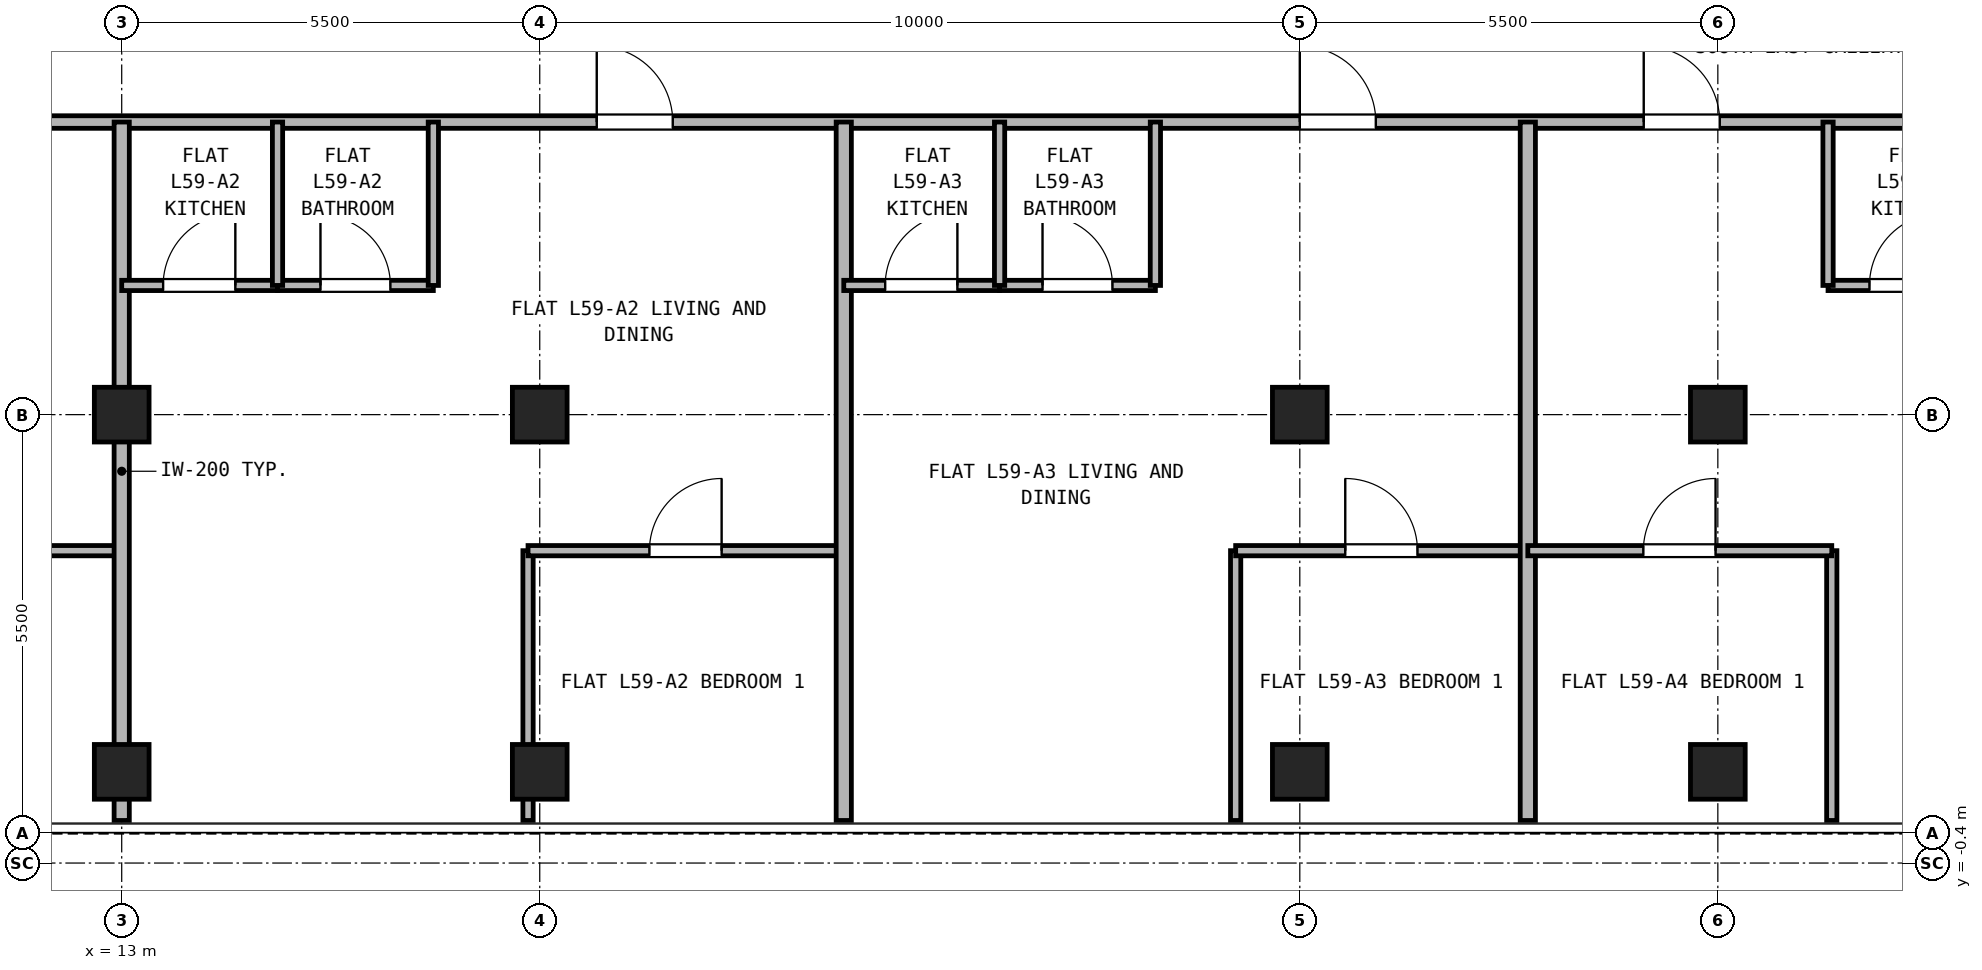
"""IFC4 building model, lengths in metres.
Left out: names, types, materials, properties, quantities, classifications, styles, units other than length and angle.
Written with IfcOpenShell. Run it as: python <this file> out.ifc"""

import sys

from ifc_helpers import new_model, si_unit, direction, frame, frame_2d, origin, origin_2d, place, context, subcontext, project, spatial, rectangle, hollow_rectangle, extrude, source, transform, mapped, element, fill, save


model = new_model("IFC4")
c1 = context("Model", 3, precision=1e-05, world=origin(), true_north=direction((0.0, 1.0)))
c2 = subcontext(c1, "Body", "Model", "MODEL_VIEW")
j1 = project(units=[si_unit("LENGTHUNIT", "METRE"), si_unit("PLANEANGLEUNIT", "RADIAN")], contexts=[c1])
p1 = place(None, origin())
s1 = spatial("IfcSite", under=j1, at=p1, CompositionType="ELEMENT")
p2 = place(p1, origin())
s2 = spatial("IfcBuilding", under=s1, at=p2, CompositionType="ELEMENT")
p3 = place(p2, frame((0.0, 0.0, 209.2)))
s3 = spatial("IfcBuildingStorey", under=s2, at=p3, CompositionType="ELEMENT", Elevation=209.2)
m1 = source(origin(), c2, "Body", "SweptSolid", [
    extrude(hollow_rectangle(XDim=0.72, YDim=0.72, WallThickness=0.04, at=origin_2d()), origin(), (0.0, 0.0, 1.0), 2.95),
])
for number, where, z_axis, x_axis in (
    (1, (13.0, 0.8, 0.0), (0.0, 0.0, 1.0), (1.0, 0.0, 0.0)),
    (2, (18.5, 0.8, 0.0), (0.0, 0.0, 1.0), (1.0, 0.0, 0.0)),
    (3, (28.5, 0.8, 0.0), (0.0, 0.0, 1.0), (1.0, 0.0, 0.0)),
    (4, (34.0, 0.8, 0.0), (0.0, 0.0, 1.0), (1.0, 0.0, 0.0)),
    (5, (13.0, 5.5, 0.0), (0.0, 0.0, 1.0), (1.0, 0.0, 0.0)),
    (6, (18.5, 5.5, 0.0), (0.0, 0.0, 1.0), (1.0, 0.0, 0.0)),
    (7, (28.5, 5.5, 0.0), (0.0, 0.0, 1.0), (1.0, 0.0, 0.0)),
    (8, (34.0, 5.5, 0.0), (0.0, 0.0, 1.0), (1.0, 0.0, 0.0)),
):
    element("IfcColumn", number, at=place(p3, frame(where, z_axis=z_axis, x_axis=x_axis)), inside=s3, PredefinedType="COLUMN", context=c2, shape_type="MappedRepresentation", body=[
        mapped(m1, transform((0.0, 0.0, 0.0), x_axis=(1.0, 0.0, 0.0), y_axis=(0.0, 1.0, 0.0), z_axis=(0.0, 0.0, 1.0), scale=1.0)),
    ])
p4 = place(p3, frame((0.16, 9.35, 0.0), z_axis=(0.0, 0.0, 1.0), x_axis=(1.0, 0.0, 0.0)))
e9 = element("IfcWall", 9, at=p4, inside=s3, PredefinedType="PARTITIONING", context=c2, shape_type="SweptSolid", body=[
    extrude(rectangle(XDim=41.48, YDim=0.165, at=frame_2d((20.74, 0.0))), origin(), (0.0, 0.0, 1.0), 2.95),
])
p5 = place(p4, frame((9.64, 0.0, 0.0)))
e10 = element("IfcOpeningElement", 10, at=p5, cuts=e9, PredefinedType="OPENING", context=c2, shape_type="SweptSolid", body=[
    extrude(rectangle(XDim=1.0, YDim=2.15, at=frame_2d((0.5, 1.075))), frame((0.0, 0.093, 0.0), z_axis=(0.0, -1.0, 0.0), x_axis=(1.0, 0.0, 0.0)), (0.0, 0.0, 1.0), 0.185),
])
p6 = place(p4, frame((19.09, 0.0, 0.0)))
e11 = element("IfcOpeningElement", 11, at=p6, cuts=e9, PredefinedType="OPENING", context=c2, shape_type="SweptSolid", body=[
    extrude(rectangle(XDim=1.0, YDim=2.15, at=frame_2d((0.5, 1.075))), frame((0.0, 0.093, 0.0), z_axis=(0.0, -1.0, 0.0), x_axis=(1.0, 0.0, 0.0)), (0.0, 0.0, 1.0), 0.185),
])
p7 = place(p4, frame((28.34, 0.0, 0.0)))
e12 = element("IfcOpeningElement", 12, at=p7, cuts=e9, PredefinedType="OPENING", context=c2, shape_type="SweptSolid", body=[
    extrude(rectangle(XDim=1.0, YDim=2.15, at=frame_2d((0.5, 1.075))), frame((0.0, 0.093, 0.0), z_axis=(0.0, -1.0, 0.0), x_axis=(1.0, 0.0, 0.0)), (0.0, 0.0, 1.0), 0.185),
])
p8 = place(p4, frame((32.865, 0.0, 0.0)))
e13 = element("IfcOpeningElement", 13, at=p8, cuts=e9, PredefinedType="OPENING", context=c2, shape_type="SweptSolid", body=[
    extrude(rectangle(XDim=1.0, YDim=2.15, at=frame_2d((0.5, 1.075))), frame((0.0, 0.093, 0.0), z_axis=(0.0, -1.0, 0.0), x_axis=(1.0, 0.0, 0.0)), (0.0, 0.0, 1.0), 0.185),
])
p9 = place(p3, frame((7.327, 3.71, 0.0), z_axis=(0.0, 0.0, 1.0), x_axis=(1.0, 0.0, 0.0)))
e14 = element("IfcWall", 14, at=p9, inside=s3, PredefinedType="PARTITIONING", context=c2, shape_type="SweptSolid", body=[
    extrude(rectangle(XDim=5.673, YDim=0.135, at=frame_2d((2.836, 0.0))), origin(), (0.0, 0.0, 1.0), 2.95),
])
p10 = place(p9, frame((2.356, 0.0, 0.0)))
e15 = element("IfcOpeningElement", 15, at=p10, cuts=e14, PredefinedType="OPENING", context=c2, shape_type="SweptSolid", body=[
    extrude(rectangle(XDim=0.95, YDim=2.15, at=frame_2d((0.475, 1.075))), frame((0.0, 0.077, 0.0), z_axis=(0.0, -1.0, 0.0), x_axis=(1.0, 0.0, 0.0)), (0.0, 0.0, 1.0), 0.155),
])
p11 = place(p3, frame((13.0, 0.16, 0.0), z_axis=(0.0, 0.0, 1.0), x_axis=(0.0, 1.0, 0.0)))
e16 = element("IfcWall", 16, at=p11, inside=s3, PredefinedType="PARTITIONING", context=c2, shape_type="SweptSolid", body=[
    extrude(rectangle(XDim=9.19, YDim=0.2, at=frame_2d((4.595, 0.0))), origin(), (0.0, 0.0, 1.0), 2.323),
])
p12 = place(p3, frame((13.0, 7.2, 0.0), z_axis=(0.0, 0.0, 1.0), x_axis=(1.0, 0.0, 0.0)))
e17 = element("IfcWall", 17, at=p12, inside=s3, PredefinedType="PARTITIONING", context=c2, shape_type="SweptSolid", body=[
    extrude(rectangle(XDim=2.05, YDim=0.135, at=frame_2d((1.025, 0.0))), origin(), (0.0, 0.0, 1.0), 2.95),
])
p13 = place(p12, frame((0.545, 0.0, 0.0)))
e18 = element("IfcOpeningElement", 18, at=p13, cuts=e17, PredefinedType="OPENING", context=c2, shape_type="SweptSolid", body=[
    extrude(rectangle(XDim=0.95, YDim=2.15, at=frame_2d((0.475, 1.075))), frame((0.0, 0.077, 0.0), z_axis=(0.0, -1.0, 0.0), x_axis=(1.0, 0.0, 0.0)), (0.0, 0.0, 1.0), 0.155),
])
p14 = place(p3, frame((15.05, 7.2, 0.0), z_axis=(0.0, 0.0, 1.0), x_axis=(1.0, 0.0, 0.0)))
e19 = element("IfcWall", 19, at=p14, inside=s3, PredefinedType="PARTITIONING", context=c2, shape_type="SweptSolid", body=[
    extrude(rectangle(XDim=2.05, YDim=0.135, at=frame_2d((1.025, 0.0))), origin(), (0.0, 0.0, 1.0), 2.95),
])
p15 = place(p14, frame((0.565, 0.0, 0.0)))
e20 = element("IfcOpeningElement", 20, at=p15, cuts=e19, PredefinedType="OPENING", context=c2, shape_type="SweptSolid", body=[
    extrude(rectangle(XDim=0.92, YDim=2.1, at=frame_2d((0.46, 1.05))), frame((0.0, 0.077, 0.0), z_axis=(0.0, -1.0, 0.0), x_axis=(1.0, 0.0, 0.0)), (0.0, 0.0, 1.0), 0.155),
])
for number, where, z_axis, x_axis in (
    (21, (15.05, 7.2, 0.0), (0.0, 0.0, 1.0), (0.0, 1.0, 0.0)),
    (22, (17.1, 7.2, 0.0), (0.0, 0.0, 1.0), (0.0, 1.0, 0.0)),
):
    element("IfcWall", number, at=place(p3, frame(where, z_axis=z_axis, x_axis=x_axis)), inside=s3, PredefinedType="PARTITIONING", context=c2, shape_type="SweptSolid", body=[
        extrude(rectangle(XDim=2.15, YDim=0.135, at=frame_2d((1.075, 0.0))), origin(), (0.0, 0.0, 1.0), 2.95),
    ])
p16 = place(p3, frame((18.346, 0.16, 0.0), z_axis=(0.0, 0.0, 1.0), x_axis=(0.0, 1.0, 0.0)))
e23 = element("IfcWall", 23, at=p16, inside=s3, PredefinedType="PARTITIONING", context=c2, shape_type="SweptSolid", body=[
    extrude(rectangle(XDim=3.55, YDim=0.135, at=frame_2d((1.775, 0.0))), origin(), (0.0, 0.0, 1.0), 2.323),
])
p17 = place(p3, frame((18.346, 3.71, 0.0), z_axis=(0.0, 0.0, 1.0), x_axis=(1.0, 0.0, 0.0)))
e24 = element("IfcWall", 24, at=p17, inside=s3, PredefinedType="PARTITIONING", context=c2, shape_type="SweptSolid", body=[
    extrude(rectangle(XDim=4.154, YDim=0.135, at=frame_2d((2.077, 0.0))), origin(), (0.0, 0.0, 1.0), 2.95),
])
p18 = place(p17, frame((1.597, 0.0, 0.0)))
e25 = element("IfcOpeningElement", 25, at=p18, cuts=e24, PredefinedType="OPENING", context=c2, shape_type="SweptSolid", body=[
    extrude(rectangle(XDim=0.95, YDim=2.15, at=frame_2d((0.475, 1.075))), frame((0.0, 0.077, 0.0), z_axis=(0.0, -1.0, 0.0), x_axis=(1.0, 0.0, 0.0)), (0.0, 0.0, 1.0), 0.155),
])
p19 = place(p3, frame((22.5, 0.16, 0.0), z_axis=(0.0, 0.0, 1.0), x_axis=(0.0, 1.0, 0.0)))
e26 = element("IfcWall", 26, at=p19, inside=s3, PredefinedType="PARTITIONING", context=c2, shape_type="SweptSolid", body=[
    extrude(rectangle(XDim=9.19, YDim=0.2, at=frame_2d((4.595, 0.0))), origin(), (0.0, 0.0, 1.0), 2.95),
])
p20 = place(p3, frame((22.5, 7.2, 0.0), z_axis=(0.0, 0.0, 1.0), x_axis=(1.0, 0.0, 0.0)))
e27 = element("IfcWall", 27, at=p20, inside=s3, PredefinedType="PARTITIONING", context=c2, shape_type="SweptSolid", body=[
    extrude(rectangle(XDim=2.05, YDim=0.135, at=frame_2d((1.025, 0.0))), origin(), (0.0, 0.0, 1.0), 2.95),
])
p21 = place(p20, frame((0.545, 0.0, 0.0)))
e28 = element("IfcOpeningElement", 28, at=p21, cuts=e27, PredefinedType="OPENING", context=c2, shape_type="SweptSolid", body=[
    extrude(rectangle(XDim=0.95, YDim=2.15, at=frame_2d((0.475, 1.075))), frame((0.0, 0.077, 0.0), z_axis=(0.0, -1.0, 0.0), x_axis=(1.0, 0.0, 0.0)), (0.0, 0.0, 1.0), 0.155),
])
p22 = place(p3, frame((24.55, 7.2, 0.0), z_axis=(0.0, 0.0, 1.0), x_axis=(1.0, 0.0, 0.0)))
e29 = element("IfcWall", 29, at=p22, inside=s3, PredefinedType="PARTITIONING", context=c2, shape_type="SweptSolid", body=[
    extrude(rectangle(XDim=2.05, YDim=0.135, at=frame_2d((1.025, 0.0))), origin(), (0.0, 0.0, 1.0), 2.95),
])
p23 = place(p22, frame((0.565, 0.0, 0.0)))
e30 = element("IfcOpeningElement", 30, at=p23, cuts=e29, PredefinedType="OPENING", context=c2, shape_type="SweptSolid", body=[
    extrude(rectangle(XDim=0.92, YDim=2.1, at=frame_2d((0.46, 1.05))), frame((0.0, 0.077, 0.0), z_axis=(0.0, -1.0, 0.0), x_axis=(1.0, 0.0, 0.0)), (0.0, 0.0, 1.0), 0.155),
])
for number, where, z_axis, x_axis in (
    (31, (24.55, 7.2, 0.0), (0.0, 0.0, 1.0), (0.0, 1.0, 0.0)),
    (32, (26.6, 7.2, 0.0), (0.0, 0.0, 1.0), (0.0, 1.0, 0.0)),
):
    element("IfcWall", number, at=place(p3, frame(where, z_axis=z_axis, x_axis=x_axis)), inside=s3, PredefinedType="PARTITIONING", context=c2, shape_type="SweptSolid", body=[
        extrude(rectangle(XDim=2.15, YDim=0.135, at=frame_2d((1.075, 0.0))), origin(), (0.0, 0.0, 1.0), 2.95),
    ])
p24 = place(p3, frame((27.656, 0.16, 0.0), z_axis=(0.0, 0.0, 1.0), x_axis=(0.0, 1.0, 0.0)))
e33 = element("IfcWall", 33, at=p24, inside=s3, PredefinedType="PARTITIONING", context=c2, shape_type="SweptSolid", body=[
    extrude(rectangle(XDim=3.55, YDim=0.135, at=frame_2d((1.775, 0.0))), origin(), (0.0, 0.0, 1.0), 2.95),
])
p25 = place(p3, frame((27.656, 3.71, 0.0), z_axis=(0.0, 0.0, 1.0), x_axis=(1.0, 0.0, 0.0)))
e34 = element("IfcWall", 34, at=p25, inside=s3, PredefinedType="PARTITIONING", context=c2, shape_type="SweptSolid", body=[
    extrude(rectangle(XDim=3.844, YDim=0.135, at=frame_2d((1.922, 0.0))), origin(), (0.0, 0.0, 1.0), 2.95),
])
p26 = place(p25, frame((1.442, 0.0, 0.0)))
e35 = element("IfcOpeningElement", 35, at=p26, cuts=e34, PredefinedType="OPENING", context=c2, shape_type="SweptSolid", body=[
    extrude(rectangle(XDim=0.95, YDim=2.15, at=frame_2d((0.475, 1.075))), frame((0.0, 0.077, 0.0), z_axis=(0.0, -1.0, 0.0), x_axis=(1.0, 0.0, 0.0)), (0.0, 0.0, 1.0), 0.155),
])
p27 = place(p3, frame((31.5, 0.16, 0.0), z_axis=(0.0, 0.0, 1.0), x_axis=(0.0, 1.0, 0.0)))
e36 = element("IfcWall", 36, at=p27, inside=s3, PredefinedType="PARTITIONING", context=c2, shape_type="SweptSolid", body=[
    extrude(rectangle(XDim=9.19, YDim=0.2, at=frame_2d((4.595, 0.0))), origin(), (0.0, 0.0, 1.0), 2.95),
])
p28 = place(p3, frame((35.45, 7.2, 0.0), z_axis=(0.0, 0.0, 1.0), x_axis=(1.0, 0.0, 0.0)))
e37 = element("IfcWall", 37, at=p28, inside=s3, PredefinedType="PARTITIONING", context=c2, shape_type="SweptSolid", body=[
    extrude(rectangle(XDim=2.05, YDim=0.135, at=frame_2d((1.025, 0.0))), origin(), (0.0, 0.0, 1.0), 2.95),
])
p29 = place(p28, frame((0.545, 0.0, 0.0)))
e38 = element("IfcOpeningElement", 38, at=p29, cuts=e37, PredefinedType="OPENING", context=c2, shape_type="SweptSolid", body=[
    extrude(rectangle(XDim=0.95, YDim=2.15, at=frame_2d((0.475, 1.075))), frame((0.0, 0.077, 0.0), z_axis=(0.0, -1.0, 0.0), x_axis=(1.0, 0.0, 0.0)), (0.0, 0.0, 1.0), 0.155),
])
p30 = place(p3, frame((35.45, 7.2, 0.0), z_axis=(0.0, 0.0, 1.0), x_axis=(0.0, 1.0, 0.0)))
e39 = element("IfcWall", 39, at=p30, inside=s3, PredefinedType="PARTITIONING", context=c2, shape_type="SweptSolid", body=[
    extrude(rectangle(XDim=2.15, YDim=0.135, at=frame_2d((1.075, 0.0))), origin(), (0.0, 0.0, 1.0), 2.95),
])
p31 = place(p3, frame((35.499, 0.16, 0.0), z_axis=(0.0, 0.0, 1.0), x_axis=(0.0, 1.0, 0.0)))
e40 = element("IfcWall", 40, at=p31, inside=s3, PredefinedType="PARTITIONING", context=c2, shape_type="SweptSolid", body=[
    extrude(rectangle(XDim=3.55, YDim=0.135, at=frame_2d((1.775, 0.0))), origin(), (0.0, 0.0, 1.0), 2.95),
])
p32 = place(p3, frame((31.5, 3.71, 0.0), z_axis=(0.0, 0.0, 1.0), x_axis=(1.0, 0.0, 0.0)))
e41 = element("IfcWall", 41, at=p32, inside=s3, PredefinedType="PARTITIONING", context=c2, shape_type="SweptSolid", body=[
    extrude(rectangle(XDim=3.999, YDim=0.135, at=frame_2d((2.0, 0.0))), origin(), (0.0, 0.0, 1.0), 2.95),
])
p33 = place(p32, frame((1.52, 0.0, 0.0)))
e42 = element("IfcOpeningElement", 42, at=p33, cuts=e41, PredefinedType="OPENING", context=c2, shape_type="SweptSolid", body=[
    extrude(rectangle(XDim=0.95, YDim=2.15, at=frame_2d((0.475, 1.075))), frame((0.0, 0.077, 0.0), z_axis=(0.0, -1.0, 0.0), x_axis=(1.0, 0.0, 0.0)), (0.0, 0.0, 1.0), 0.155),
])
p34 = place(p13, origin())
e43 = element("IfcDoor", 43, at=p34, inside=s3, OperationType="SINGLE_SWING_RIGHT", PredefinedType="DOOR", context=c2, shape_type="SweptSolid", body=[
    extrude(rectangle(XDim=0.95, YDim=2.15, at=frame_2d((0.475, 1.075))), frame((0.0, 0.025, 0.0), z_axis=(0.0, -1.0, 0.0), x_axis=(1.0, 0.0, 0.0)), (0.0, 0.0, 1.0), 0.05),
])
fill(e18, e43)
p35 = place(p15, origin())
e44 = element("IfcDoor", 44, at=p35, inside=s3, OperationType="SINGLE_SWING_LEFT", PredefinedType="DOOR", context=c2, shape_type="SweptSolid", body=[
    extrude(rectangle(XDim=0.92, YDim=2.1, at=frame_2d((0.46, 1.05))), frame((0.0, 0.025, 0.0), z_axis=(0.0, -1.0, 0.0), x_axis=(1.0, 0.0, 0.0)), (0.0, 0.0, 1.0), 0.05),
])
fill(e20, e44)
p36 = place(p18, frame((0.95, 0.0, 0.0), z_axis=(0.0, 0.0, 1.0), x_axis=(-1.0, 0.0, 0.0)))
e45 = element("IfcDoor", 45, at=p36, inside=s3, OperationType="SINGLE_SWING_RIGHT", PredefinedType="DOOR", context=c2, shape_type="SweptSolid", body=[
    extrude(rectangle(XDim=0.95, YDim=2.15, at=frame_2d((0.475, 1.075))), frame((0.0, 0.025, 0.0), z_axis=(0.0, -1.0, 0.0), x_axis=(1.0, 0.0, 0.0)), (0.0, 0.0, 1.0), 0.05),
])
fill(e25, e45)
p37 = place(p6, frame((1.0, 0.0, 0.0), z_axis=(0.0, 0.0, 1.0), x_axis=(-1.0, 0.0, 0.0)))
e46 = element("IfcDoor", 46, at=p37, inside=s3, OperationType="SINGLE_SWING_LEFT", PredefinedType="DOOR", context=c2, shape_type="SweptSolid", body=[
    extrude(rectangle(XDim=1.0, YDim=2.15, at=frame_2d((0.5, 1.075))), frame((0.0, 0.025, 0.0), z_axis=(0.0, -1.0, 0.0), x_axis=(1.0, 0.0, 0.0)), (0.0, 0.0, 1.0), 0.05),
])
fill(e11, e46)
p38 = place(p21, origin())
e47 = element("IfcDoor", 47, at=p38, inside=s3, OperationType="SINGLE_SWING_RIGHT", PredefinedType="DOOR", context=c2, shape_type="SweptSolid", body=[
    extrude(rectangle(XDim=0.95, YDim=2.15, at=frame_2d((0.475, 1.075))), frame((0.0, 0.025, 0.0), z_axis=(0.0, -1.0, 0.0), x_axis=(1.0, 0.0, 0.0)), (0.0, 0.0, 1.0), 0.05),
])
fill(e28, e47)
p39 = place(p23, origin())
e48 = element("IfcDoor", 48, at=p39, inside=s3, OperationType="SINGLE_SWING_LEFT", PredefinedType="DOOR", context=c2, shape_type="SweptSolid", body=[
    extrude(rectangle(XDim=0.92, YDim=2.1, at=frame_2d((0.46, 1.05))), frame((0.0, 0.025, 0.0), z_axis=(0.0, -1.0, 0.0), x_axis=(1.0, 0.0, 0.0)), (0.0, 0.0, 1.0), 0.05),
])
fill(e30, e48)
p40 = place(p26, frame((0.95, 0.0, 0.0), z_axis=(0.0, 0.0, 1.0), x_axis=(-1.0, 0.0, 0.0)))
e49 = element("IfcDoor", 49, at=p40, inside=s3, OperationType="SINGLE_SWING_LEFT", PredefinedType="DOOR", context=c2, shape_type="SweptSolid", body=[
    extrude(rectangle(XDim=0.95, YDim=2.15, at=frame_2d((0.475, 1.075))), frame((0.0, 0.025, 0.0), z_axis=(0.0, -1.0, 0.0), x_axis=(1.0, 0.0, 0.0)), (0.0, 0.0, 1.0), 0.05),
])
fill(e35, e49)
p41 = place(p7, frame((1.0, 0.0, 0.0), z_axis=(0.0, 0.0, 1.0), x_axis=(-1.0, 0.0, 0.0)))
e50 = element("IfcDoor", 50, at=p41, inside=s3, OperationType="SINGLE_SWING_LEFT", PredefinedType="DOOR", context=c2, shape_type="SweptSolid", body=[
    extrude(rectangle(XDim=1.0, YDim=2.15, at=frame_2d((0.5, 1.075))), frame((0.0, 0.025, 0.0), z_axis=(0.0, -1.0, 0.0), x_axis=(1.0, 0.0, 0.0)), (0.0, 0.0, 1.0), 0.05),
])
fill(e12, e50)
p42 = place(p29, origin())
e51 = element("IfcDoor", 51, at=p42, inside=s3, OperationType="SINGLE_SWING_RIGHT", PredefinedType="DOOR", context=c2, shape_type="SweptSolid", body=[
    extrude(rectangle(XDim=0.95, YDim=2.15, at=frame_2d((0.475, 1.075))), frame((0.0, 0.025, 0.0), z_axis=(0.0, -1.0, 0.0), x_axis=(1.0, 0.0, 0.0)), (0.0, 0.0, 1.0), 0.05),
])
fill(e38, e51)
p43 = place(p33, frame((0.95, 0.0, 0.0), z_axis=(0.0, 0.0, 1.0), x_axis=(-1.0, 0.0, 0.0)))
e52 = element("IfcDoor", 52, at=p43, inside=s3, OperationType="SINGLE_SWING_RIGHT", PredefinedType="DOOR", context=c2, shape_type="SweptSolid", body=[
    extrude(rectangle(XDim=0.95, YDim=2.15, at=frame_2d((0.475, 1.075))), frame((0.0, 0.025, 0.0), z_axis=(0.0, -1.0, 0.0), x_axis=(1.0, 0.0, 0.0)), (0.0, 0.0, 1.0), 0.05),
])
fill(e42, e52)
p44 = place(p8, frame((1.0, 0.0, 0.0), z_axis=(0.0, 0.0, 1.0), x_axis=(-1.0, 0.0, 0.0)))
e53 = element("IfcDoor", 53, at=p44, inside=s3, OperationType="SINGLE_SWING_LEFT", PredefinedType="DOOR", context=c2, shape_type="SweptSolid", body=[
    extrude(rectangle(XDim=1.0, YDim=2.15, at=frame_2d((0.5, 1.075))), frame((0.0, 0.025, 0.0), z_axis=(0.0, -1.0, 0.0), x_axis=(1.0, 0.0, 0.0)), (0.0, 0.0, 1.0), 0.05),
])
fill(e13, e53)
save(model, sys.argv[1])
